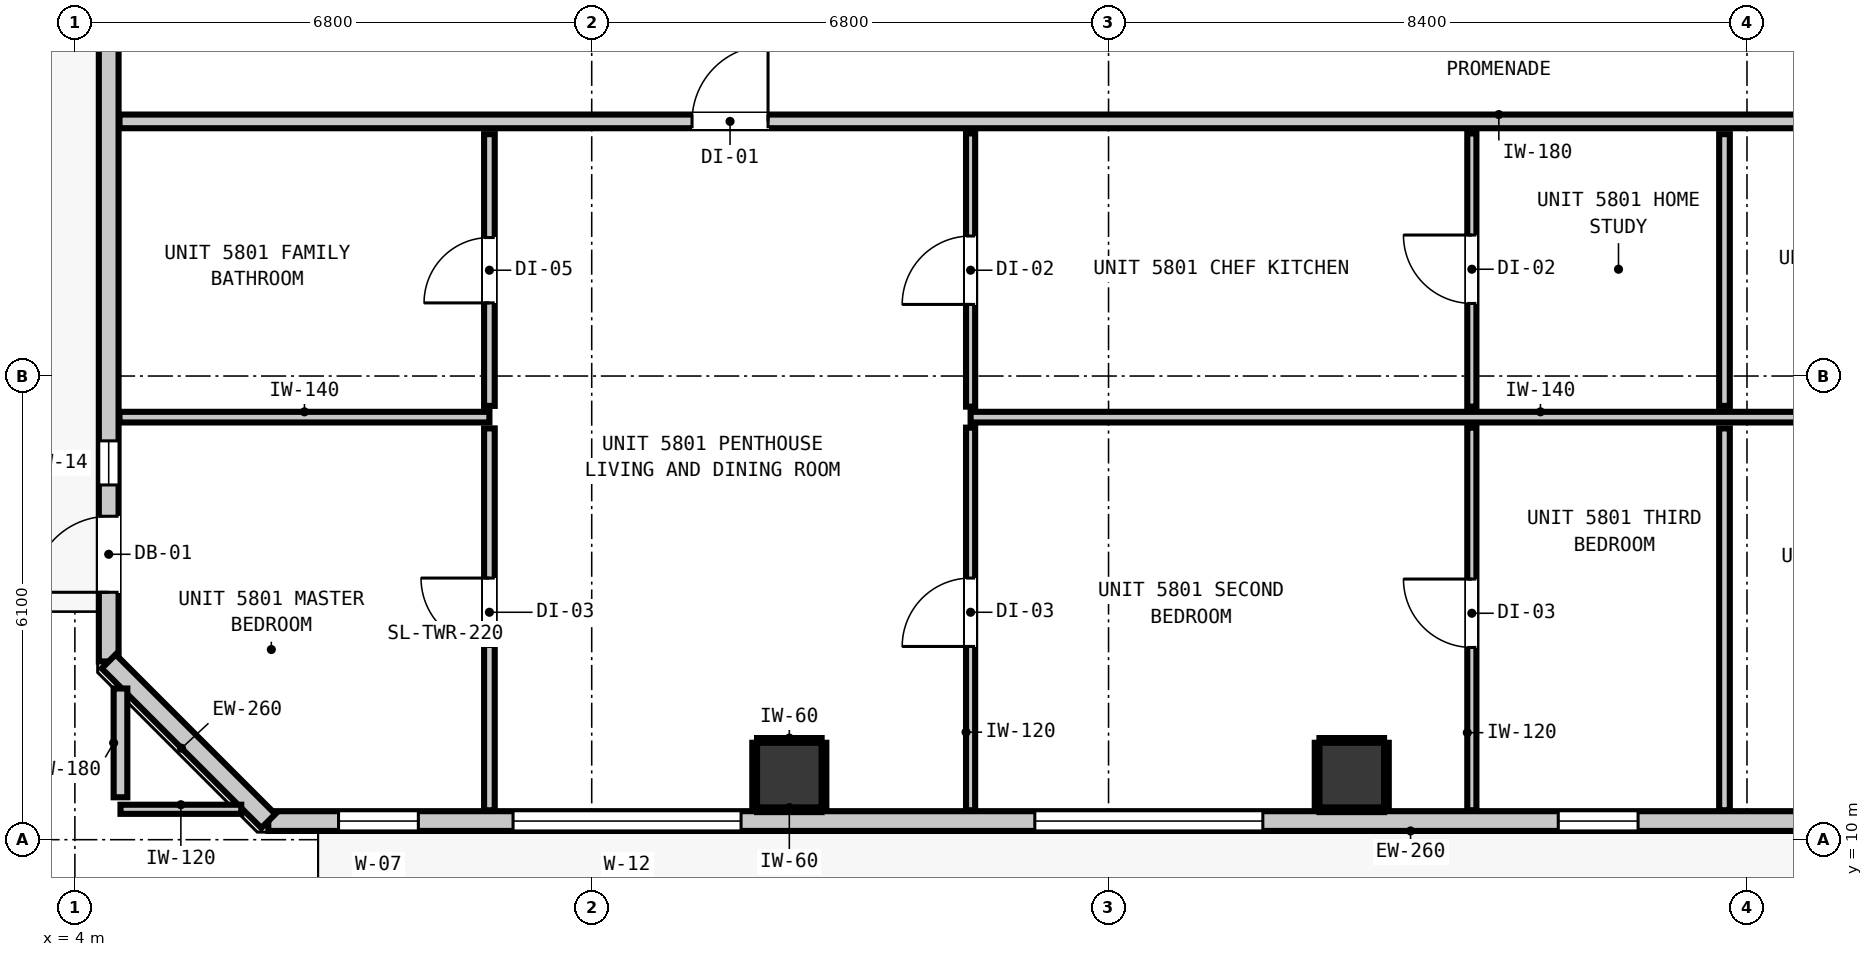
"""IFC4 building model, lengths in metres.
Left out: names, types, materials, properties, quantities, classifications, styles, units other than length and angle.
Written with IfcOpenShell. Run it as: python <this file> out.ifc"""

import sys

from ifc_helpers import new_model, si_unit, direction, frame, frame_2d, origin, origin_2d, place, context, subcontext, project, spatial, rectangle, extrude, element, fill, save


model = new_model("IFC4")
c1 = context("Model", 3, precision=1e-05, world=origin(), true_north=direction((0.0, 1.0)))
c2 = subcontext(c1, "Body", "Model", "MODEL_VIEW")
j1 = project(units=[si_unit("LENGTHUNIT", "METRE"), si_unit("PLANEANGLEUNIT", "RADIAN")], contexts=[c1])
p1 = place(None, origin())
s1 = spatial("IfcSite", under=j1, at=p1, CompositionType="ELEMENT")
p2 = place(p1, origin())
s2 = spatial("IfcBuilding", under=s1, at=p2, CompositionType="ELEMENT")
p3 = place(p2, frame((0.0, 0.0, 200.12)))
s3 = spatial("IfcBuildingStorey", under=s2, at=p3, CompositionType="ELEMENT", Elevation=200.12)
for number, where, z_axis, x_axis in (
    (1, (13.4, 10.85, 0.0), (0.0, 0.0, 1.0), (1.0, 0.0, 0.0)),
    (2, (20.8, 10.85, 0.0), (0.0, 0.0, 1.0), (1.0, 0.0, 0.0)),
):
    element("IfcColumn", number, at=place(p3, frame(where, z_axis=z_axis, x_axis=x_axis)), inside=s3, PredefinedType="COLUMN", context=c2, shape_type="SweptSolid", body=[
        extrude(rectangle(XDim=0.85, YDim=0.85, at=origin_2d()), origin(), (0.0, 0.0, 1.0), 3.32),
    ])
p4 = place(p3, frame((4.445, 12.345, 0.0), z_axis=(0.0, 0.0, 1.0), x_axis=(0.0, 1.0, 0.0)))
e3 = element("IfcWall", 3, at=p4, inside=s3, PredefinedType="STANDARD", context=c2, shape_type="SweptSolid", body=[
    extrude(rectangle(XDim=30.31, YDim=0.26, at=frame_2d((15.155, 0.0))), origin(), (0.0, 0.0, 1.0), 3.1),
])
p5 = place(p4, frame((0.91, 0.0, 0.0)))
e4 = element("IfcOpeningElement", 4, at=p5, cuts=e3, PredefinedType="OPENING", context=c2, shape_type="SweptSolid", body=[
    extrude(rectangle(XDim=1.0, YDim=2.15, at=frame_2d((0.5, 1.075))), frame((0.0, 0.14, 0.0), z_axis=(0.0, -1.0, 0.0), x_axis=(1.0, 0.0, 0.0)), (0.0, 0.0, 1.0), 0.28),
])
p6 = place(p4, frame((2.322, 0.0, 0.85)))
e5 = element("IfcOpeningElement", 5, at=p6, cuts=e3, PredefinedType="OPENING", context=c2, shape_type="SweptSolid", body=[
    extrude(rectangle(XDim=0.58, YDim=1.5, at=frame_2d((0.29, 0.75))), frame((0.0, 0.14, 0.0), z_axis=(0.0, -1.0, 0.0), x_axis=(1.0, 0.0, 0.0)), (0.0, 0.0, 1.0), 0.28),
])
p7 = place(p4, frame((21.205, 0.0, 0.85)))
e6 = element("IfcOpeningElement", 6, at=p7, cuts=e3, PredefinedType="OPENING", context=c2, shape_type="SweptSolid", body=[
    extrude(rectangle(XDim=3.0, YDim=2.1, at=frame_2d((1.5, 1.05))), frame((0.0, 0.14, 0.0), z_axis=(0.0, -1.0, 0.0), x_axis=(1.0, 0.0, 0.0)), (0.0, 0.0, 1.0), 0.28),
])
p8 = place(p3, frame((39.255, 10.245, 0.0), z_axis=(0.0, 0.0, 1.0), x_axis=(-1.0, 0.0, 0.0)))
e7 = element("IfcWall", 7, at=p8, inside=s3, PredefinedType="STANDARD", context=c2, shape_type="SweptSolid", body=[
    extrude(rectangle(XDim=32.71, YDim=0.26, at=frame_2d((16.355, 0.0))), origin(), (0.0, 0.0, 1.0), 3.1),
])
p9 = place(p8, frame((4.776, 0.0, 0.0)))
e8 = element("IfcOpeningElement", 8, at=p9, cuts=e7, PredefinedType="OPENING", context=c2, shape_type="SweptSolid", body=[
    extrude(rectangle(XDim=1.0, YDim=2.15, at=frame_2d((0.5, 1.075))), frame((0.0, 0.14, 0.0), z_axis=(0.0, -1.0, 0.0), x_axis=(1.0, 0.0, 0.0)), (0.0, 0.0, 1.0), 0.28),
])
p10 = place(p8, frame((26.49, 0.0, 0.85)))
e9 = element("IfcOpeningElement", 9, at=p10, cuts=e7, PredefinedType="OPENING", context=c2, shape_type="SweptSolid", body=[
    extrude(rectangle(XDim=3.0, YDim=2.1, at=frame_2d((1.5, 1.05))), frame((0.0, 0.14, 0.0), z_axis=(0.0, -1.0, 0.0), x_axis=(1.0, 0.0, 0.0)), (0.0, 0.0, 1.0), 0.28),
])
p11 = place(p8, frame((30.736, 0.0, 0.85)))
e10 = element("IfcOpeningElement", 10, at=p11, cuts=e7, PredefinedType="OPENING", context=c2, shape_type="SweptSolid", body=[
    extrude(rectangle(XDim=1.05, YDim=1.65, at=frame_2d((0.525, 0.825))), frame((0.0, 0.14, 0.0), z_axis=(0.0, -1.0, 0.0), x_axis=(1.0, 0.0, 0.0)), (0.0, 0.0, 1.0), 0.28),
])
p12 = place(p8, frame((19.625, 0.0, 0.85)))
e11 = element("IfcOpeningElement", 11, at=p12, cuts=e7, PredefinedType="OPENING", context=c2, shape_type="SweptSolid", body=[
    extrude(rectangle(XDim=3.0, YDim=2.1, at=frame_2d((1.5, 1.05))), frame((0.0, 0.14, 0.0), z_axis=(0.0, -1.0, 0.0), x_axis=(1.0, 0.0, 0.0)), (0.0, 0.0, 1.0), 0.28),
])
p13 = place(p8, frame((14.688, 0.0, 0.85)))
e12 = element("IfcOpeningElement", 12, at=p13, cuts=e7, PredefinedType="OPENING", context=c2, shape_type="SweptSolid", body=[
    extrude(rectangle(XDim=1.05, YDim=1.65, at=frame_2d((0.525, 0.825))), frame((0.0, 0.14, 0.0), z_axis=(0.0, -1.0, 0.0), x_axis=(1.0, 0.0, 0.0)), (0.0, 0.0, 1.0), 0.28),
])
p14 = place(p8, frame((6.65, 0.0, 0.85)))
e13 = element("IfcOpeningElement", 13, at=p14, cuts=e7, PredefinedType="OPENING", context=c2, shape_type="SweptSolid", body=[
    extrude(rectangle(XDim=1.05, YDim=1.65, at=frame_2d((0.525, 0.825))), frame((0.0, 0.14, 0.0), z_axis=(0.0, -1.0, 0.0), x_axis=(1.0, 0.0, 0.0)), (0.0, 0.0, 1.0), 0.28),
])
p15 = place(p8, frame((11.441, 0.0, 0.85)))
e14 = element("IfcOpeningElement", 14, at=p15, cuts=e7, PredefinedType="OPENING", context=c2, shape_type="SweptSolid", body=[
    extrude(rectangle(XDim=1.05, YDim=1.65, at=frame_2d((0.525, 0.825))), frame((0.0, 0.14, 0.0), z_axis=(0.0, -1.0, 0.0), x_axis=(1.0, 0.0, 0.0)), (0.0, 0.0, 1.0), 0.28),
])
p16 = place(p8, frame((1.198, 0.0, 0.85)))
e15 = element("IfcOpeningElement", 15, at=p16, cuts=e7, PredefinedType="OPENING", context=c2, shape_type="SweptSolid", body=[
    extrude(rectangle(XDim=0.9, YDim=1.5, at=frame_2d((0.45, 0.75))), frame((0.0, 0.14, 0.0), z_axis=(0.0, -1.0, 0.0), x_axis=(1.0, 0.0, 0.0)), (0.0, 0.0, 1.0), 0.28),
])
p17 = place(p3, frame((6.545, 10.245, 0.0), z_axis=(0.0, 0.0, 1.0), x_axis=(-0.707106781187, 0.707106781187, 0.0)))
e16 = element("IfcWall", 16, at=p17, inside=s3, PredefinedType="STANDARD", context=c2, shape_type="SweptSolid", body=[
    extrude(rectangle(XDim=2.97, YDim=0.26, at=frame_2d((1.485, 0.0))), origin(), (0.0, 0.0, 1.0), 3.1),
])
p18 = place(p3, frame((4.587, 19.45, 0.0), z_axis=(0.0, 0.0, 1.0), x_axis=(1.0, 0.0, 0.0)))
e17 = element("IfcWall", 17, at=p18, inside=s3, PredefinedType="PARTITIONING", context=c2, shape_type="SweptSolid", body=[
    extrude(rectangle(XDim=36.626, YDim=0.18, at=frame_2d((18.313, 0.0))), origin(), (0.0, 0.0, 1.0), 3.1),
])
p19 = place(p18, frame((7.533, 0.0, 0.0)))
e18 = element("IfcOpeningElement", 18, at=p19, cuts=e17, PredefinedType="OPENING", context=c2, shape_type="SweptSolid", body=[
    extrude(rectangle(XDim=1.0, YDim=2.15, at=frame_2d((0.5, 1.075))), frame((0.0, 0.1, 0.0), z_axis=(0.0, -1.0, 0.0), x_axis=(1.0, 0.0, 0.0)), (0.0, 0.0, 1.0), 0.2),
])
p20 = place(p18, frame((27.763, 0.0, 0.0)))
e19 = element("IfcOpeningElement", 19, at=p20, cuts=e17, PredefinedType="OPENING", context=c2, shape_type="SweptSolid", body=[
    extrude(rectangle(XDim=1.0, YDim=2.15, at=frame_2d((0.5, 1.075))), frame((0.0, 0.1, 0.0), z_axis=(0.0, -1.0, 0.0), x_axis=(1.0, 0.0, 0.0)), (0.0, 0.0, 1.0), 0.2),
])
p21 = place(p3, frame((4.587, 15.559, 0.0), z_axis=(0.0, 0.0, 1.0), x_axis=(1.0, 0.0, 0.0)))
e20 = element("IfcWall", 20, at=p21, inside=s3, PredefinedType="PARTITIONING", context=c2, shape_type="SweptSolid", body=[
    extrude(rectangle(XDim=4.867, YDim=0.14, at=frame_2d((2.434, 0.0))), origin(), (0.0, 0.0, 1.0), 3.1),
])
p22 = place(p3, frame((15.785, 15.559, 0.0), z_axis=(0.0, 0.0, 1.0), x_axis=(1.0, 0.0, 0.0)))
e21 = element("IfcWall", 21, at=p22, inside=s3, PredefinedType="PARTITIONING", context=c2, shape_type="SweptSolid", body=[
    extrude(rectangle(XDim=14.995, YDim=0.14, at=frame_2d((7.498, 0.0))), origin(), (0.0, 0.0, 1.0), 3.1),
])
p23 = place(p3, frame((4.6, 10.4, 0.0), z_axis=(0.0, 0.0, 1.0), x_axis=(1.0, 0.0, 0.0)))
e22 = element("IfcWall", 22, at=p23, inside=s3, PredefinedType="PARTITIONING", context=c2, shape_type="SweptSolid", body=[
    extrude(rectangle(XDim=1.589, YDim=0.12, at=frame_2d((0.794, 0.0))), origin(), (0.0, 0.0, 1.0), 3.1),
])
p24 = place(p3, frame((4.6, 10.558, 0.0), z_axis=(0.0, 0.0, 1.0), x_axis=(0.0, 1.0, 0.0)))
e23 = element("IfcWall", 23, at=p24, inside=s3, PredefinedType="PARTITIONING", context=c2, shape_type="SweptSolid", body=[
    extrude(rectangle(XDim=1.431, YDim=0.18, at=frame_2d((0.715, 0.0))), origin(), (0.0, 0.0, 1.0), 3.1),
])
p25 = place(p3, frame((9.454, 10.387, 0.0), z_axis=(0.0, 0.0, 1.0), x_axis=(0.0, 1.0, 0.0)))
e24 = element("IfcWall", 24, at=p25, inside=s3, PredefinedType="PARTITIONING", context=c2, shape_type="SweptSolid", body=[
    extrude(rectangle(XDim=5.024, YDim=0.14, at=frame_2d((2.512, 0.0))), origin(), (0.0, 0.0, 1.0), 3.1),
])
p26 = place(p25, frame((2.155, 0.0, 0.0)))
e25 = element("IfcOpeningElement", 25, at=p26, cuts=e24, PredefinedType="OPENING", context=c2, shape_type="SweptSolid", body=[
    extrude(rectangle(XDim=0.9, YDim=2.1, at=frame_2d((0.45, 1.05))), frame((0.0, 0.08, 0.0), z_axis=(0.0, -1.0, 0.0), x_axis=(1.0, 0.0, 0.0)), (0.0, 0.0, 1.0), 0.16),
])
p27 = place(p3, frame((9.454, 15.707, 0.0), z_axis=(0.0, 0.0, 1.0), x_axis=(0.0, 1.0, 0.0)))
e26 = element("IfcWall", 26, at=p27, inside=s3, PredefinedType="PARTITIONING", context=c2, shape_type="SweptSolid", body=[
    extrude(rectangle(XDim=3.575, YDim=0.14, at=frame_2d((1.788, 0.0))), origin(), (0.0, 0.0, 1.0), 2.477),
])
p28 = place(p27, frame((1.355, 0.0, 0.0)))
e27 = element("IfcOpeningElement", 27, at=p28, cuts=e26, PredefinedType="OPENING", context=c2, shape_type="SweptSolid", body=[
    extrude(rectangle(XDim=0.86, YDim=2.02, at=frame_2d((0.43, 1.01))), frame((0.0, 0.08, 0.0), z_axis=(0.0, -1.0, 0.0), x_axis=(1.0, 0.0, 0.0)), (0.0, 0.0, 1.0), 0.16),
])
p29 = place(p3, frame((25.704, 10.387, 0.0), z_axis=(0.0, 0.0, 1.0), x_axis=(0.0, 1.0, 0.0)))
e28 = element("IfcWall", 28, at=p29, inside=s3, PredefinedType="PARTITIONING", context=c2, shape_type="SweptSolid", body=[
    extrude(rectangle(XDim=5.024, YDim=0.14, at=frame_2d((2.512, 0.0))), origin(), (0.0, 0.0, 1.0), 3.1),
])
p30 = place(p3, frame((25.704, 15.707, 0.0), z_axis=(0.0, 0.0, 1.0), x_axis=(0.0, 1.0, 0.0)))
e29 = element("IfcWall", 29, at=p30, inside=s3, PredefinedType="PARTITIONING", context=c2, shape_type="SweptSolid", body=[
    extrude(rectangle(XDim=3.575, YDim=0.14, at=frame_2d((1.788, 0.0))), origin(), (0.0, 0.0, 1.0), 3.1),
])
p31 = place(p3, frame((15.785, 10.387, 0.0), z_axis=(0.0, 0.0, 1.0), x_axis=(0.0, 1.0, 0.0)))
e30 = element("IfcWall", 30, at=p31, inside=s3, PredefinedType="PARTITIONING", context=c2, shape_type="SweptSolid", body=[
    extrude(rectangle(XDim=5.034, YDim=0.12, at=frame_2d((2.517, 0.0))), origin(), (0.0, 0.0, 1.0), 3.1),
])
p32 = place(p31, frame((2.155, 0.0, 0.0)))
e31 = element("IfcOpeningElement", 31, at=p32, cuts=e30, PredefinedType="OPENING", context=c2, shape_type="SweptSolid", body=[
    extrude(rectangle(XDim=0.9, YDim=2.1, at=frame_2d((0.45, 1.05))), frame((0.0, 0.07, 0.0), z_axis=(0.0, -1.0, 0.0), x_axis=(1.0, 0.0, 0.0)), (0.0, 0.0, 1.0), 0.14),
])
p33 = place(p3, frame((15.785, 15.697, 0.0), z_axis=(0.0, 0.0, 1.0), x_axis=(0.0, 1.0, 0.0)))
e32 = element("IfcWall", 32, at=p33, inside=s3, PredefinedType="PARTITIONING", context=c2, shape_type="SweptSolid", body=[
    extrude(rectangle(XDim=3.595, YDim=0.12, at=frame_2d((1.797, 0.0))), origin(), (0.0, 0.0, 1.0), 3.1),
])
p34 = place(p33, frame((1.345, 0.0, 0.0)))
e33 = element("IfcOpeningElement", 33, at=p34, cuts=e32, PredefinedType="OPENING", context=c2, shape_type="SweptSolid", body=[
    extrude(rectangle(XDim=0.9, YDim=2.1, at=frame_2d((0.45, 1.05))), frame((0.0, 0.07, 0.0), z_axis=(0.0, -1.0, 0.0), x_axis=(1.0, 0.0, 0.0)), (0.0, 0.0, 1.0), 0.14),
])
p35 = place(p3, frame((22.38, 10.387, 0.0), z_axis=(0.0, 0.0, 1.0), x_axis=(0.0, 1.0, 0.0)))
e34 = element("IfcWall", 34, at=p35, inside=s3, PredefinedType="PARTITIONING", context=c2, shape_type="SweptSolid", body=[
    extrude(rectangle(XDim=5.034, YDim=0.12, at=frame_2d((2.517, 0.0))), origin(), (0.0, 0.0, 1.0), 3.1),
])
p36 = place(p35, frame((2.142, 0.0, 0.0)))
e35 = element("IfcOpeningElement", 35, at=p36, cuts=e34, PredefinedType="OPENING", context=c2, shape_type="SweptSolid", body=[
    extrude(rectangle(XDim=0.9, YDim=2.1, at=frame_2d((0.45, 1.05))), frame((0.0, 0.07, 0.0), z_axis=(0.0, -1.0, 0.0), x_axis=(1.0, 0.0, 0.0)), (0.0, 0.0, 1.0), 0.14),
])
p37 = place(p3, frame((22.38, 15.697, 0.0), z_axis=(0.0, 0.0, 1.0), x_axis=(0.0, 1.0, 0.0)))
e36 = element("IfcWall", 36, at=p37, inside=s3, PredefinedType="PARTITIONING", context=c2, shape_type="SweptSolid", body=[
    extrude(rectangle(XDim=3.595, YDim=0.12, at=frame_2d((1.797, 0.0))), origin(), (0.0, 0.0, 1.0), 3.1),
])
p38 = place(p37, frame((1.358, 0.0, 0.0)))
e37 = element("IfcOpeningElement", 37, at=p38, cuts=e36, PredefinedType="OPENING", context=c2, shape_type="SweptSolid", body=[
    extrude(rectangle(XDim=0.9, YDim=2.1, at=frame_2d((0.45, 1.05))), frame((0.0, 0.07, 0.0), z_axis=(0.0, -1.0, 0.0), x_axis=(1.0, 0.0, 0.0)), (0.0, 0.0, 1.0), 0.14),
])
for number, where, z_axis, x_axis in (
    (38, (12.975, 10.393, 0.0), (0.0, 0.0, 1.0), (1.0, 0.0, 0.0)),
    (39, (12.975, 11.307, 0.0), (0.0, 0.0, 1.0), (1.0, 0.0, 0.0)),
    (40, (12.943, 10.425, 0.0), (0.0, 0.0, 1.0), (0.0, 1.0, 0.0)),
    (41, (13.857, 10.425, 0.0), (0.0, 0.0, 1.0), (0.0, 1.0, 0.0)),
):
    element("IfcWall", number, at=place(p3, frame(where, z_axis=z_axis, x_axis=x_axis)), inside=s3, PredefinedType="PARTITIONING", context=c2, shape_type="SweptSolid", body=[
        extrude(rectangle(XDim=0.85, YDim=0.06, at=frame_2d((0.425, 0.0))), origin(), (0.0, 0.0, 1.0), 1.45),
    ])
for number, where, z_axis, x_axis in (
    (42, (20.375, 10.393, 0.0), (0.0, 0.0, 1.0), (1.0, 0.0, 0.0)),
    (43, (20.375, 11.307, 0.0), (0.0, 0.0, 1.0), (1.0, 0.0, 0.0)),
):
    element("IfcWall", number, at=place(p3, frame(where, z_axis=z_axis, x_axis=x_axis)), inside=s3, PredefinedType="PARTITIONING", context=c2, shape_type="SweptSolid", body=[
        extrude(rectangle(XDim=0.85, YDim=0.06, at=frame_2d((0.425, 0.0))), origin(), (0.0, 0.0, 1.0), 1.45),
    ])
for number, where, z_axis, x_axis in (
    (44, (20.343, 10.425, 0.0), (0.0, 0.0, 1.0), (0.0, 1.0, 0.0)),
    (45, (21.257, 10.425, 0.0), (0.0, 0.0, 1.0), (0.0, 1.0, 0.0)),
):
    element("IfcWall", number, at=place(p3, frame(where, z_axis=z_axis, x_axis=x_axis)), inside=s3, PredefinedType="PARTITIONING", context=c2, shape_type="SweptSolid", body=[
        extrude(rectangle(XDim=0.85, YDim=0.06, at=frame_2d((0.425, 0.0))), origin(), (0.0, 0.0, 1.0), 1.45),
    ])
p39 = place(p5, origin())
e46 = element("IfcDoor", 46, at=p39, inside=s3, OperationType="SINGLE_SWING_LEFT", PredefinedType="DOOR", context=c2, shape_type="SweptSolid", body=[
    extrude(rectangle(XDim=1.0, YDim=2.15, at=frame_2d((0.5, 1.075))), frame((0.0, 0.025, 0.0), z_axis=(0.0, -1.0, 0.0), x_axis=(1.0, 0.0, 0.0)), (0.0, 0.0, 1.0), 0.05),
])
fill(e4, e46)
p40 = place(p6, origin())
e47 = element("IfcWindow", 47, at=p40, inside=s3, PartitioningType="SINGLE_PANEL", PredefinedType="WINDOW", context=c2, shape_type="SweptSolid", body=[
    extrude(rectangle(XDim=0.58, YDim=1.5, at=frame_2d((0.29, 0.75))), frame((0.0, 0.03, 0.0), z_axis=(0.0, -1.0, 0.0), x_axis=(1.0, 0.0, 0.0)), (0.0, 0.0, 1.0), 0.06),
])
fill(e5, e47)
p41 = place(p10, origin())
e48 = element("IfcWindow", 48, at=p41, inside=s3, PartitioningType="SINGLE_PANEL", PredefinedType="WINDOW", context=c2, shape_type="SweptSolid", body=[
    extrude(rectangle(XDim=3.0, YDim=2.1, at=frame_2d((1.5, 1.05))), frame((0.0, 0.03, 0.0), z_axis=(0.0, -1.0, 0.0), x_axis=(1.0, 0.0, 0.0)), (0.0, 0.0, 1.0), 0.06),
])
fill(e9, e48)
p42 = place(p11, origin())
e49 = element("IfcWindow", 49, at=p42, inside=s3, PartitioningType="SINGLE_PANEL", PredefinedType="WINDOW", context=c2, shape_type="SweptSolid", body=[
    extrude(rectangle(XDim=1.05, YDim=1.65, at=frame_2d((0.525, 0.825))), frame((0.0, 0.03, 0.0), z_axis=(0.0, -1.0, 0.0), x_axis=(1.0, 0.0, 0.0)), (0.0, 0.0, 1.0), 0.06),
])
fill(e10, e49)
p43 = place(p12, origin())
e50 = element("IfcWindow", 50, at=p43, inside=s3, PartitioningType="SINGLE_PANEL", PredefinedType="WINDOW", context=c2, shape_type="SweptSolid", body=[
    extrude(rectangle(XDim=3.0, YDim=2.1, at=frame_2d((1.5, 1.05))), frame((0.0, 0.03, 0.0), z_axis=(0.0, -1.0, 0.0), x_axis=(1.0, 0.0, 0.0)), (0.0, 0.0, 1.0), 0.06),
])
fill(e11, e50)
p44 = place(p13, origin())
e51 = element("IfcWindow", 51, at=p44, inside=s3, PartitioningType="SINGLE_PANEL", PredefinedType="WINDOW", context=c2, shape_type="SweptSolid", body=[
    extrude(rectangle(XDim=1.05, YDim=1.65, at=frame_2d((0.525, 0.825))), frame((0.0, 0.03, 0.0), z_axis=(0.0, -1.0, 0.0), x_axis=(1.0, 0.0, 0.0)), (0.0, 0.0, 1.0), 0.06),
])
fill(e12, e51)
p45 = place(p19, origin())
e52 = element("IfcDoor", 52, at=p45, inside=s3, OperationType="SINGLE_SWING_RIGHT", PredefinedType="DOOR", context=c2, shape_type="SweptSolid", body=[
    extrude(rectangle(XDim=1.0, YDim=2.15, at=frame_2d((0.5, 1.075))), frame((0.0, 0.025, 0.0), z_axis=(0.0, -1.0, 0.0), x_axis=(1.0, 0.0, 0.0)), (0.0, 0.0, 1.0), 0.05),
])
fill(e18, e52)
p46 = place(p28, origin())
e53 = element("IfcDoor", 53, at=p46, inside=s3, OperationType="SINGLE_SWING_LEFT", PredefinedType="DOOR", context=c2, shape_type="SweptSolid", body=[
    extrude(rectangle(XDim=0.86, YDim=2.02, at=frame_2d((0.43, 1.01))), frame((0.0, 0.025, 0.0), z_axis=(0.0, -1.0, 0.0), x_axis=(1.0, 0.0, 0.0)), (0.0, 0.0, 1.0), 0.05),
])
fill(e27, e53)
p47 = place(p26, origin())
e54 = element("IfcDoor", 54, at=p47, inside=s3, OperationType="SINGLE_SWING_RIGHT", PredefinedType="DOOR", context=c2, shape_type="SweptSolid", body=[
    extrude(rectangle(XDim=0.9, YDim=2.1, at=frame_2d((0.45, 1.05))), frame((0.0, 0.025, 0.0), z_axis=(0.0, -1.0, 0.0), x_axis=(1.0, 0.0, 0.0)), (0.0, 0.0, 1.0), 0.05),
])
fill(e25, e54)
p48 = place(p34, origin())
e55 = element("IfcDoor", 55, at=p48, inside=s3, OperationType="SINGLE_SWING_LEFT", PredefinedType="DOOR", context=c2, shape_type="SweptSolid", body=[
    extrude(rectangle(XDim=0.9, YDim=2.1, at=frame_2d((0.45, 1.05))), frame((0.0, 0.025, 0.0), z_axis=(0.0, -1.0, 0.0), x_axis=(1.0, 0.0, 0.0)), (0.0, 0.0, 1.0), 0.05),
])
fill(e33, e55)
p49 = place(p38, origin())
e56 = element("IfcDoor", 56, at=p49, inside=s3, OperationType="SINGLE_SWING_RIGHT", PredefinedType="DOOR", context=c2, shape_type="SweptSolid", body=[
    extrude(rectangle(XDim=0.9, YDim=2.1, at=frame_2d((0.45, 1.05))), frame((0.0, 0.025, 0.0), z_axis=(0.0, -1.0, 0.0), x_axis=(1.0, 0.0, 0.0)), (0.0, 0.0, 1.0), 0.05),
])
fill(e37, e56)
p50 = place(p32, origin())
e57 = element("IfcDoor", 57, at=p50, inside=s3, OperationType="SINGLE_SWING_LEFT", PredefinedType="DOOR", context=c2, shape_type="SweptSolid", body=[
    extrude(rectangle(XDim=0.9, YDim=2.1, at=frame_2d((0.45, 1.05))), frame((0.0, 0.025, 0.0), z_axis=(0.0, -1.0, 0.0), x_axis=(1.0, 0.0, 0.0)), (0.0, 0.0, 1.0), 0.05),
])
fill(e31, e57)
p51 = place(p36, origin())
e58 = element("IfcDoor", 58, at=p51, inside=s3, OperationType="SINGLE_SWING_RIGHT", PredefinedType="DOOR", context=c2, shape_type="SweptSolid", body=[
    extrude(rectangle(XDim=0.9, YDim=2.1, at=frame_2d((0.45, 1.05))), frame((0.0, 0.025, 0.0), z_axis=(0.0, -1.0, 0.0), x_axis=(1.0, 0.0, 0.0)), (0.0, 0.0, 1.0), 0.05),
])
fill(e35, e58)
save(model, sys.argv[1])
